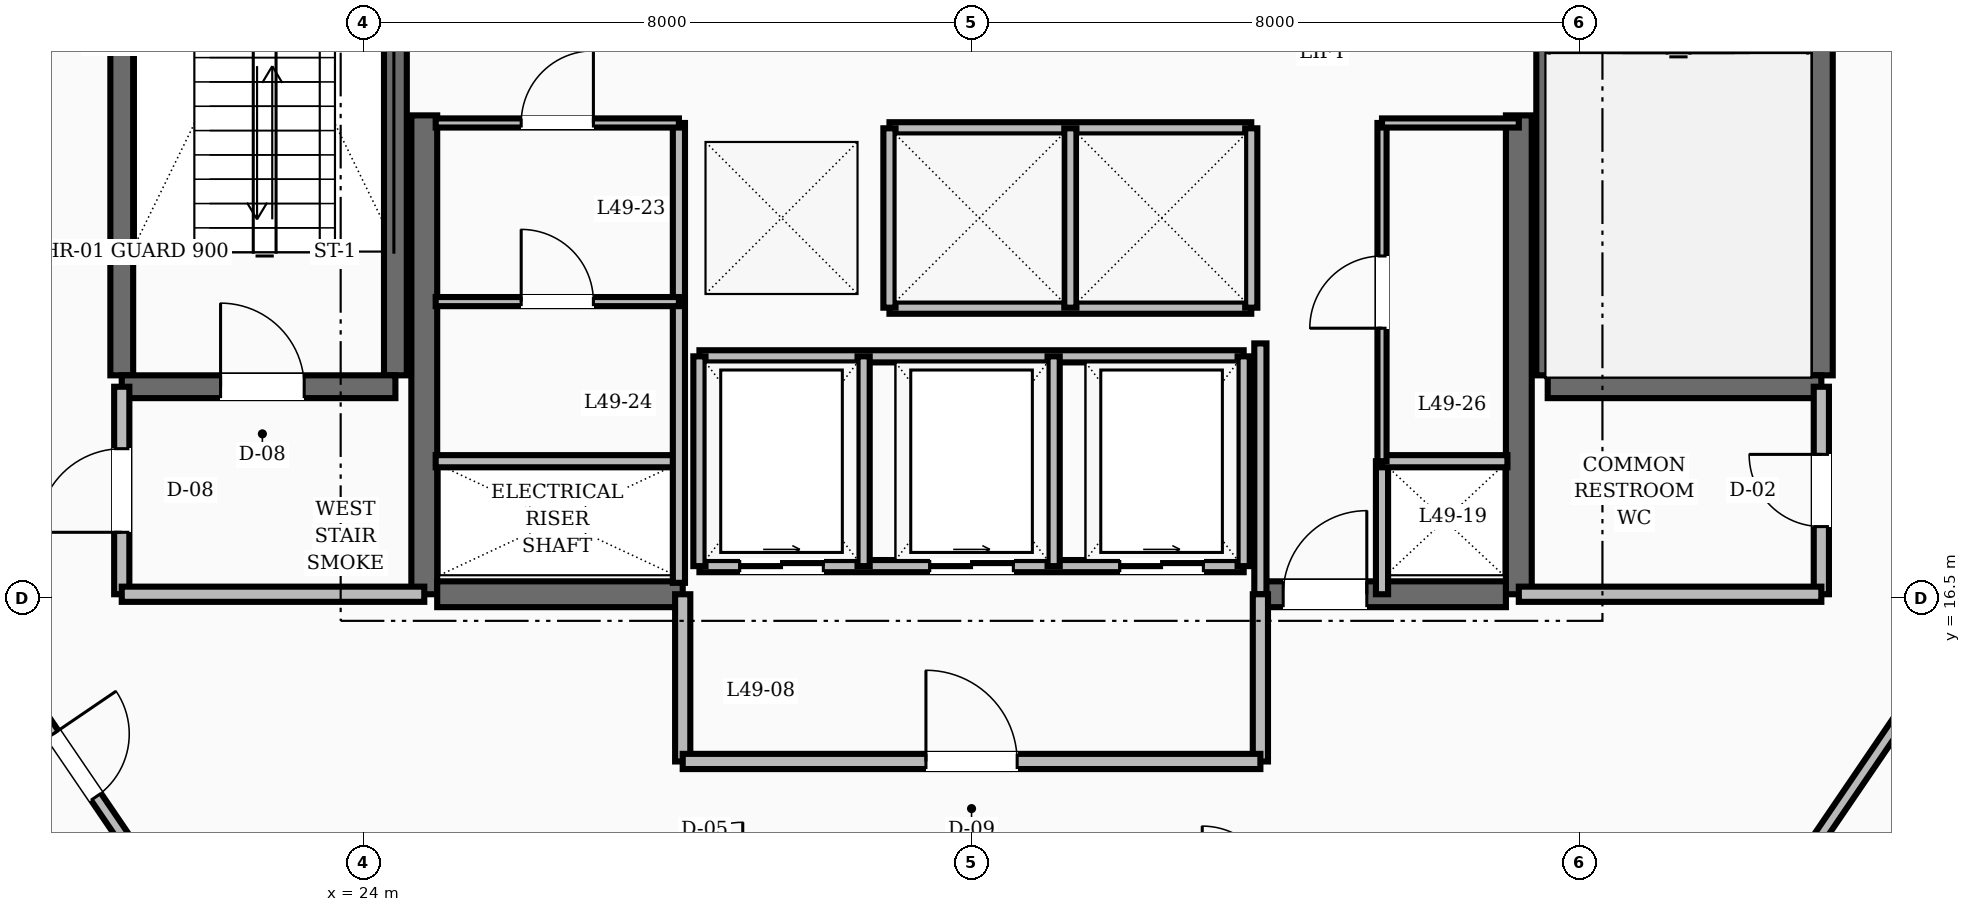
"""IFC4 building model, lengths in metres.
Left out: names, types, materials, properties, quantities, classifications, styles, units other than length and angle.
Written with IfcOpenShell. Run it as: python <this file> out.ifc"""

import sys

from ifc_helpers import new_model, si_unit, direction, frame, frame_2d, origin, place, context, subcontext, project, spatial, rectangle, extrude, element, fill, save


model = new_model("IFC4")
c1 = context("Model", 3, precision=1e-05, world=origin(), true_north=direction((0.0, 1.0)))
c2 = subcontext(c1, "Body", "Model", "MODEL_VIEW")
j1 = project(units=[si_unit("LENGTHUNIT", "METRE"), si_unit("PLANEANGLEUNIT", "RADIAN")], contexts=[c1])
p1 = place(None, origin())
s1 = spatial("IfcSite", under=j1, at=p1, CompositionType="ELEMENT")
p2 = place(p1, origin())
s2 = spatial("IfcBuilding", under=s1, at=p2, CompositionType="ELEMENT")
p3 = place(p2, frame((0.0, 0.0, 189.2)))
s3 = spatial("IfcBuildingStorey", under=s2, at=p3, CompositionType="ELEMENT", Elevation=189.2)
for number, where, z_axis, x_axis in (
    (1, (24.8, 16.55, 0.0), (0.0, 0.0, 1.0), (0.0, 1.0, 0.0)),
    (2, (39.2, 16.55, 0.0), (0.0, 0.0, 1.0), (0.0, 1.0, 0.0)),
):
    element("IfcWall", number, at=place(p3, frame(where, z_axis=z_axis, x_axis=x_axis)), inside=s3, PredefinedType="SHEAR", context=c2, shape_type="SweptSolid", body=[
        extrude(rectangle(XDim=6.3, YDim=0.34, at=frame_2d((3.15, 0.0))), origin(), (0.0, 0.0, 1.0), 3.6),
    ])
p4 = place(p3, frame((24.97, 16.55, 0.0), z_axis=(0.0, 0.0, 1.0), x_axis=(1.0, 0.0, 0.0)))
e3 = element("IfcWall", 3, at=p4, inside=s3, PredefinedType="SHEAR", context=c2, shape_type="SweptSolid", body=[
    extrude(rectangle(XDim=3.23, YDim=0.34, at=frame_2d((1.615, 0.0))), origin(), (0.0, 0.0, 1.0), 3.6),
])
p5 = place(p3, frame((35.8, 16.55, 0.0), z_axis=(0.0, 0.0, 1.0), x_axis=(1.0, 0.0, 0.0)))
e4 = element("IfcWall", 4, at=p5, inside=s3, PredefinedType="SHEAR", context=c2, shape_type="SweptSolid", body=[
    extrude(rectangle(XDim=3.23, YDim=0.34, at=frame_2d((1.615, 0.0))), origin(), (0.0, 0.0, 1.0), 3.6),
])
p6 = place(p5, frame((0.3, 0.0, 0.0)))
e5 = element("IfcOpeningElement", 5, at=p6, cuts=e4, PredefinedType="OPENING", context=c2, shape_type="SweptSolid", body=[
    extrude(rectangle(XDim=1.1, YDim=2.1, at=frame_2d((0.55, 1.05))), frame((0.0, 0.18, 0.0), z_axis=(0.0, -1.0, 0.0), x_axis=(1.0, 0.0, 0.0)), (0.0, 0.0, 1.0), 0.36),
])
for number, where, z_axis, x_axis in (
    (6, (20.82, 19.43, 0.0), (0.0, 0.0, 1.0), (0.0, 1.0, 0.0)),
    (7, (24.42, 19.43, 0.0), (0.0, 0.0, 1.0), (0.0, 1.0, 0.0)),
):
    element("IfcWall", number, at=place(p3, frame(where, z_axis=z_axis, x_axis=x_axis)), inside=s3, PredefinedType="SHEAR", context=c2, shape_type="SweptSolid", body=[
        extrude(rectangle(XDim=8.74, YDim=0.3, at=frame_2d((4.37, 0.0))), origin(), (0.0, 0.0, 1.0), 3.6),
    ])
p7 = place(p3, frame((20.82, 19.28, 0.0), z_axis=(0.0, 0.0, 1.0), x_axis=(1.0, 0.0, 0.0)))
e8 = element("IfcWall", 8, at=p7, inside=s3, PredefinedType="SHEAR", context=c2, shape_type="SweptSolid", body=[
    extrude(rectangle(XDim=3.6, YDim=0.3, at=frame_2d((1.8, 0.0))), origin(), (0.0, 0.0, 1.0), 3.6),
])
p8 = place(p7, frame((1.3, 0.0, 0.0)))
e9 = element("IfcOpeningElement", 9, at=p8, cuts=e8, PredefinedType="OPENING", context=c2, shape_type="SweptSolid", body=[
    extrude(rectangle(XDim=1.1, YDim=2.1, at=frame_2d((0.55, 1.05))), frame((0.0, 0.16, 0.0), z_axis=(0.0, -1.0, 0.0), x_axis=(1.0, 0.0, 0.0)), (0.0, 0.0, 1.0), 0.32),
])
for number, where, z_axis, x_axis in (
    (10, (43.18, 19.43, 0.0), (0.0, 0.0, 1.0), (0.0, 1.0, 0.0)),
    (11, (39.58, 19.43, 0.0), (0.0, 0.0, 1.0), (0.0, 1.0, 0.0)),
):
    element("IfcWall", number, at=place(p3, frame(where, z_axis=z_axis, x_axis=x_axis)), inside=s3, PredefinedType="SHEAR", context=c2, shape_type="SweptSolid", body=[
        extrude(rectangle(XDim=8.74, YDim=0.3, at=frame_2d((4.37, 0.0))), origin(), (0.0, 0.0, 1.0), 3.6),
    ])
p9 = place(p3, frame((39.58, 19.28, 0.0), z_axis=(0.0, 0.0, 1.0), x_axis=(1.0, 0.0, 0.0)))
e12 = element("IfcWall", 12, at=p9, inside=s3, PredefinedType="SHEAR", context=c2, shape_type="SweptSolid", body=[
    extrude(rectangle(XDim=3.6, YDim=0.3, at=frame_2d((1.8, 0.0))), origin(), (0.0, 0.0, 1.0), 3.6),
])
p10 = place(p3, frame((20.82, 16.55, 0.0), z_axis=(0.0, 0.0, 1.0), x_axis=(0.0, 1.0, 0.0)))
e13 = element("IfcWall", 13, at=p10, inside=s3, PredefinedType="SOLIDWALL", context=c2, shape_type="SweptSolid", body=[
    extrude(rectangle(XDim=2.73, YDim=0.2, at=frame_2d((1.365, 0.0))), origin(), (0.0, 0.0, 1.0), 2.8),
])
p11 = place(p10, frame((0.815, 0.0, 0.0)))
e14 = element("IfcOpeningElement", 14, at=p11, cuts=e13, PredefinedType="OPENING", context=c2, shape_type="SweptSolid", body=[
    extrude(rectangle(XDim=1.1, YDim=2.1, at=frame_2d((0.55, 1.05))), frame((0.0, 0.11, 0.0), z_axis=(0.0, -1.0, 0.0), x_axis=(1.0, 0.0, 0.0)), (0.0, 0.0, 1.0), 0.22),
])
p12 = place(p3, frame((20.82, 16.55, 0.0), z_axis=(0.0, 0.0, 1.0), x_axis=(1.0, 0.0, 0.0)))
e15 = element("IfcWall", 15, at=p12, inside=s3, PredefinedType="SOLIDWALL", context=c2, shape_type="SweptSolid", body=[
    extrude(rectangle(XDim=3.98, YDim=0.2, at=frame_2d((1.99, 0.0))), origin(), (0.0, 0.0, 1.0), 2.8),
])
p13 = place(p3, frame((43.18, 16.55, 0.0), z_axis=(0.0, 0.0, 1.0), x_axis=(0.0, 1.0, 0.0)))
e16 = element("IfcWall", 16, at=p13, inside=s3, PredefinedType="SOLIDWALL", context=c2, shape_type="SweptSolid", body=[
    extrude(rectangle(XDim=2.73, YDim=0.2, at=frame_2d((1.365, 0.0))), origin(), (0.0, 0.0, 1.0), 2.8),
])
p14 = place(p13, frame((0.89, 0.0, 0.0)))
e17 = element("IfcOpeningElement", 17, at=p14, cuts=e16, PredefinedType="OPENING", context=c2, shape_type="SweptSolid", body=[
    extrude(rectangle(XDim=0.95, YDim=2.1, at=frame_2d((0.475, 1.05))), frame((0.0, 0.11, 0.0), z_axis=(0.0, -1.0, 0.0), x_axis=(1.0, 0.0, 0.0)), (0.0, 0.0, 1.0), 0.22),
])
p15 = place(p3, frame((39.2, 16.55, 0.0), z_axis=(0.0, 0.0, 1.0), x_axis=(1.0, 0.0, 0.0)))
e18 = element("IfcWall", 18, at=p15, inside=s3, PredefinedType="SOLIDWALL", context=c2, shape_type="SweptSolid", body=[
    extrude(rectangle(XDim=3.98, YDim=0.2, at=frame_2d((1.99, 0.0))), origin(), (0.0, 0.0, 1.0), 2.8),
])
p16 = place(p3, frame((35.8, 16.55, 0.0), z_axis=(0.0, 0.0, 1.0), x_axis=(0.0, 1.0, 0.0)))
e19 = element("IfcWall", 19, at=p16, inside=s3, PredefinedType="SOLIDWALL", context=c2, shape_type="SweptSolid", body=[
    extrude(rectangle(XDim=3.3, YDim=0.16, at=frame_2d((1.65, 0.0))), origin(), (0.0, 0.0, 1.0), 2.8),
])
p17 = place(p3, frame((37.4, 16.55, 0.0), z_axis=(0.0, 0.0, 1.0), x_axis=(0.0, 1.0, 0.0)))
e20 = element("IfcWall", 20, at=p17, inside=s3, PredefinedType="SOLIDWALL", context=c2, shape_type="SweptSolid", body=[
    extrude(rectangle(XDim=1.75, YDim=0.16, at=frame_2d((0.875, 0.0))), origin(), (0.0, 0.0, 1.0), 2.8),
])
for number, where, z_axis, x_axis in (
    (21, (28.2, 14.35, 0.0), (0.0, 0.0, 1.0), (0.0, 1.0, 0.0)),
    (22, (35.8, 14.35, 0.0), (0.0, 0.0, 1.0), (0.0, 1.0, 0.0)),
):
    element("IfcWall", number, at=place(p3, frame(where, z_axis=z_axis, x_axis=x_axis)), inside=s3, PredefinedType="SOLIDWALL", context=c2, shape_type="SweptSolid", body=[
        extrude(rectangle(XDim=2.2, YDim=0.2, at=frame_2d((1.1, 0.0))), origin(), (0.0, 0.0, 1.0), 2.8),
    ])
p18 = place(p3, frame((28.2, 14.35, 0.0), z_axis=(0.0, 0.0, 1.0), x_axis=(1.0, 0.0, 0.0)))
e23 = element("IfcWall", 23, at=p18, inside=s3, PredefinedType="SOLIDWALL", context=c2, shape_type="SweptSolid", body=[
    extrude(rectangle(XDim=7.6, YDim=0.2, at=frame_2d((3.8, 0.0))), origin(), (0.0, 0.0, 1.0), 2.8),
])
p19 = place(p18, frame((3.2, 0.0, 0.0)))
e24 = element("IfcOpeningElement", 24, at=p19, cuts=e23, PredefinedType="OPENING", context=c2, shape_type="SweptSolid", body=[
    extrude(rectangle(XDim=1.2, YDim=2.1, at=frame_2d((0.6, 1.05))), frame((0.0, 0.11, 0.0), z_axis=(0.0, -1.0, 0.0), x_axis=(1.0, 0.0, 0.0)), (0.0, 0.0, 1.0), 0.22),
])
for number, where, z_axis, x_axis in (
    (25, (30.92, 22.68, 0.0), (0.0, 0.0, 1.0), (1.0, 0.0, 0.0)),
    (26, (30.92, 20.32, 0.0), (0.0, 0.0, 1.0), (1.0, 0.0, 0.0)),
):
    element("IfcWall", number, at=place(p3, frame(where, z_axis=z_axis, x_axis=x_axis)), inside=s3, PredefinedType="SOLIDWALL", context=c2, shape_type="SweptSolid", body=[
        extrude(rectangle(XDim=4.76, YDim=0.16, at=frame_2d((2.38, 0.0))), origin(), (0.0, 0.0, 1.0), 2.8),
    ])
for number, where, z_axis, x_axis in (
    (27, (30.92, 20.32, 0.0), (0.0, 0.0, 1.0), (0.0, 1.0, 0.0)),
    (28, (33.3, 20.32, 0.0), (0.0, 0.0, 1.0), (0.0, 1.0, 0.0)),
    (29, (35.68, 20.32, 0.0), (0.0, 0.0, 1.0), (0.0, 1.0, 0.0)),
):
    element("IfcWall", number, at=place(p3, frame(where, z_axis=z_axis, x_axis=x_axis)), inside=s3, PredefinedType="SOLIDWALL", context=c2, shape_type="SweptSolid", body=[
        extrude(rectangle(XDim=2.36, YDim=0.16, at=frame_2d((1.18, 0.0))), origin(), (0.0, 0.0, 1.0), 2.8),
    ])
p20 = place(p3, frame((28.42, 16.92, 0.0), z_axis=(0.0, 0.0, 1.0), x_axis=(1.0, 0.0, 0.0)))
e30 = element("IfcWall", 30, at=p20, inside=s3, PredefinedType="SOLIDWALL", context=c2, shape_type="SweptSolid", body=[
    extrude(rectangle(XDim=7.16, YDim=0.16, at=frame_2d((3.58, 0.0))), origin(), (0.0, 0.0, 1.0), 2.8),
])
p21 = place(p20, frame((0.53, 0.0, 0.0)))
e31 = element("IfcOpeningElement", 31, at=p21, cuts=e30, PredefinedType="OPENING", context=c2, shape_type="SweptSolid", body=[
    extrude(rectangle(XDim=1.1, YDim=2.15, at=frame_2d((0.55, 1.075))), frame((0.0, 0.09, 0.0), z_axis=(0.0, -1.0, 0.0), x_axis=(1.0, 0.0, 0.0)), (0.0, 0.0, 1.0), 0.18),
])
p22 = place(p20, frame((3.03, 0.0, 0.0)))
e32 = element("IfcOpeningElement", 32, at=p22, cuts=e30, PredefinedType="OPENING", context=c2, shape_type="SweptSolid", body=[
    extrude(rectangle(XDim=1.1, YDim=2.15, at=frame_2d((0.55, 1.075))), frame((0.0, 0.09, 0.0), z_axis=(0.0, -1.0, 0.0), x_axis=(1.0, 0.0, 0.0)), (0.0, 0.0, 1.0), 0.18),
])
p23 = place(p20, frame((5.53, 0.0, 0.0)))
e33 = element("IfcOpeningElement", 33, at=p23, cuts=e30, PredefinedType="OPENING", context=c2, shape_type="SweptSolid", body=[
    extrude(rectangle(XDim=1.1, YDim=2.15, at=frame_2d((0.55, 1.075))), frame((0.0, 0.09, 0.0), z_axis=(0.0, -1.0, 0.0), x_axis=(1.0, 0.0, 0.0)), (0.0, 0.0, 1.0), 0.18),
])
p24 = place(p3, frame((28.42, 19.68, 0.0), z_axis=(0.0, 0.0, 1.0), x_axis=(1.0, 0.0, 0.0)))
e34 = element("IfcWall", 34, at=p24, inside=s3, PredefinedType="SOLIDWALL", context=c2, shape_type="SweptSolid", body=[
    extrude(rectangle(XDim=7.16, YDim=0.16, at=frame_2d((3.58, 0.0))), origin(), (0.0, 0.0, 1.0), 2.8),
])
for number, where, z_axis, x_axis in (
    (35, (28.42, 16.92, 0.0), (0.0, 0.0, 1.0), (0.0, 1.0, 0.0)),
    (36, (30.58, 16.92, 0.0), (0.0, 0.0, 1.0), (0.0, 1.0, 0.0)),
    (37, (33.08, 16.92, 0.0), (0.0, 0.0, 1.0), (0.0, 1.0, 0.0)),
    (38, (35.58, 16.92, 0.0), (0.0, 0.0, 1.0), (0.0, 1.0, 0.0)),
):
    element("IfcWall", number, at=place(p3, frame(where, z_axis=z_axis, x_axis=x_axis)), inside=s3, PredefinedType="SOLIDWALL", context=c2, shape_type="SweptSolid", body=[
        extrude(rectangle(XDim=2.76, YDim=0.16, at=frame_2d((1.38, 0.0))), origin(), (0.0, 0.0, 1.0), 2.8),
    ])
p25 = place(p3, frame((24.95, 18.3, 0.0), z_axis=(0.0, 0.0, 1.0), x_axis=(1.0, 0.0, 0.0)))
e39 = element("IfcWall", 39, at=p25, inside=s3, PredefinedType="SOLIDWALL", context=c2, shape_type="SweptSolid", body=[
    extrude(rectangle(XDim=3.2, YDim=0.16, at=frame_2d((1.6, 0.0))), origin(), (0.0, 0.0, 1.0), 2.8),
])
p26 = place(p3, frame((28.15, 16.7, 0.0), z_axis=(0.0, 0.0, 1.0), x_axis=(0.0, 1.0, 0.0)))
e40 = element("IfcWall", 40, at=p26, inside=s3, PredefinedType="SOLIDWALL", context=c2, shape_type="SweptSolid", body=[
    extrude(rectangle(XDim=6.05, YDim=0.16, at=frame_2d((3.025, 0.0))), origin(), (0.0, 0.0, 1.0), 2.8),
])
p27 = place(p3, frame((37.4, 18.3, 0.0), z_axis=(0.0, 0.0, 1.0), x_axis=(1.0, 0.0, 0.0)))
e41 = element("IfcWall", 41, at=p27, inside=s3, PredefinedType="SOLIDWALL", context=c2, shape_type="SweptSolid", body=[
    extrude(rectangle(XDim=1.65, YDim=0.16, at=frame_2d((0.825, 0.0))), origin(), (0.0, 0.0, 1.0), 2.8),
])
p28 = place(p3, frame((24.95, 22.75, 0.0), z_axis=(0.0, 0.0, 1.0), x_axis=(1.0, 0.0, 0.0)))
e42 = element("IfcWall", 42, at=p28, inside=s3, PredefinedType="PARTITIONING", context=c2, shape_type="SweptSolid", body=[
    extrude(rectangle(XDim=3.2, YDim=0.12, at=frame_2d((1.6, 0.0))), origin(), (0.0, 0.0, 1.0), 2.8),
])
p29 = place(p28, frame((1.125, 0.0, 0.0)))
e43 = element("IfcOpeningElement", 43, at=p29, cuts=e42, PredefinedType="OPENING", context=c2, shape_type="SweptSolid", body=[
    extrude(rectangle(XDim=0.95, YDim=2.1, at=frame_2d((0.475, 1.05))), frame((0.0, 0.07, 0.0), z_axis=(0.0, -1.0, 0.0), x_axis=(1.0, 0.0, 0.0)), (0.0, 0.0, 1.0), 0.14),
])
p30 = place(p3, frame((37.4, 18.3, 0.0), z_axis=(0.0, 0.0, 1.0), x_axis=(0.0, 1.0, 0.0)))
e44 = element("IfcWall", 44, at=p30, inside=s3, PredefinedType="PARTITIONING", context=c2, shape_type="SweptSolid", body=[
    extrude(rectangle(XDim=4.45, YDim=0.12, at=frame_2d((2.225, 0.0))), origin(), (0.0, 0.0, 1.0), 2.8),
])
p31 = place(p30, frame((1.75, 0.0, 0.0)))
e45 = element("IfcOpeningElement", 45, at=p31, cuts=e44, PredefinedType="OPENING", context=c2, shape_type="SweptSolid", body=[
    extrude(rectangle(XDim=0.95, YDim=2.1, at=frame_2d((0.475, 1.05))), frame((0.0, 0.07, 0.0), z_axis=(0.0, -1.0, 0.0), x_axis=(1.0, 0.0, 0.0)), (0.0, 0.0, 1.0), 0.14),
])
p32 = place(p3, frame((37.4, 22.75, 0.0), z_axis=(0.0, 0.0, 1.0), x_axis=(1.0, 0.0, 0.0)))
e46 = element("IfcWall", 46, at=p32, inside=s3, PredefinedType="PARTITIONING", context=c2, shape_type="SweptSolid", body=[
    extrude(rectangle(XDim=1.8, YDim=0.12, at=frame_2d((0.9, 0.0))), origin(), (0.0, 0.0, 1.0), 2.8),
])
p33 = place(p3, frame((24.95, 20.4, 0.0), z_axis=(0.0, 0.0, 1.0), x_axis=(1.0, 0.0, 0.0)))
e47 = element("IfcWall", 47, at=p33, inside=s3, PredefinedType="PARTITIONING", context=c2, shape_type="SweptSolid", body=[
    extrude(rectangle(XDim=3.2, YDim=0.12, at=frame_2d((1.6, 0.0))), origin(), (0.0, 0.0, 1.0), 2.8),
])
p34 = place(p33, frame((1.125, 0.0, 0.0)))
e48 = element("IfcOpeningElement", 48, at=p34, cuts=e47, PredefinedType="OPENING", context=c2, shape_type="SweptSolid", body=[
    extrude(rectangle(XDim=0.95, YDim=2.1, at=frame_2d((0.475, 1.05))), frame((0.0, 0.07, 0.0), z_axis=(0.0, -1.0, 0.0), x_axis=(1.0, 0.0, 0.0)), (0.0, 0.0, 1.0), 0.14),
])
p35 = place(p3, frame((19.35, 15.548, 0.0), z_axis=(0.0, 0.0, 1.0), x_axis=(0.562674669208, -0.826678423955, 0.0)))
e49 = element("IfcWall", 49, at=p35, inside=s3, PredefinedType="SOLIDWALL", context=c2, shape_type="SweptSolid", body=[
    extrude(rectangle(XDim=3.021, YDim=0.16, at=frame_2d((1.511, 0.0))), origin(), (0.0, 0.0, 1.0), 2.8),
])
p36 = place(p35, frame((1.01, 0.0, 0.0)))
e50 = element("IfcOpeningElement", 50, at=p36, cuts=e49, PredefinedType="OPENING", context=c2, shape_type="SweptSolid", body=[
    extrude(rectangle(XDim=1.0, YDim=2.1, at=frame_2d((0.5, 1.05))), frame((0.0, 0.09, 0.0), z_axis=(0.0, -1.0, 0.0), x_axis=(1.0, 0.0, 0.0)), (0.0, 0.0, 1.0), 0.18),
])
p37 = place(p3, frame((42.95, 13.05, 0.0), z_axis=(0.0, 0.0, 1.0), x_axis=(0.562674669208, 0.826678423955, 0.0)))
e51 = element("IfcWall", 51, at=p37, inside=s3, PredefinedType="SOLIDWALL", context=c2, shape_type="SweptSolid", body=[
    extrude(rectangle(XDim=3.021, YDim=0.16, at=frame_2d((1.511, 0.0))), origin(), (0.0, 0.0, 1.0), 2.8),
])
p38 = place(p8, origin())
e52 = element("IfcDoor", 52, at=p38, inside=s3, OperationType="SINGLE_SWING_LEFT", PredefinedType="DOOR", context=c2, shape_type="SweptSolid", body=[
    extrude(rectangle(XDim=1.1, YDim=2.1, at=frame_2d((0.55, 1.05))), frame((0.0, 0.025, 0.0), z_axis=(0.0, -1.0, 0.0), x_axis=(1.0, 0.0, 0.0)), (0.0, 0.0, 1.0), 0.05),
])
fill(e9, e52)
p39 = place(p11, origin())
e53 = element("IfcDoor", 53, at=p39, inside=s3, OperationType="SINGLE_SWING_LEFT", PredefinedType="DOOR", context=c2, shape_type="SweptSolid", body=[
    extrude(rectangle(XDim=1.1, YDim=2.1, at=frame_2d((0.55, 1.05))), frame((0.0, 0.025, 0.0), z_axis=(0.0, -1.0, 0.0), x_axis=(1.0, 0.0, 0.0)), (0.0, 0.0, 1.0), 0.05),
])
fill(e14, e53)
p40 = place(p14, origin())
e54 = element("IfcDoor", 54, at=p40, inside=s3, OperationType="SINGLE_SWING_RIGHT", PredefinedType="DOOR", context=c2, shape_type="SweptSolid", body=[
    extrude(rectangle(XDim=0.95, YDim=2.1, at=frame_2d((0.475, 1.05))), frame((0.0, 0.025, 0.0), z_axis=(0.0, -1.0, 0.0), x_axis=(1.0, 0.0, 0.0)), (0.0, 0.0, 1.0), 0.05),
])
fill(e17, e54)
p41 = place(p6, origin())
e55 = element("IfcDoor", 55, at=p41, inside=s3, OperationType="SINGLE_SWING_RIGHT", PredefinedType="DOOR", context=c2, shape_type="SweptSolid", body=[
    extrude(rectangle(XDim=1.1, YDim=2.1, at=frame_2d((0.55, 1.05))), frame((0.0, 0.025, 0.0), z_axis=(0.0, -1.0, 0.0), x_axis=(1.0, 0.0, 0.0)), (0.0, 0.0, 1.0), 0.05),
])
fill(e5, e55)
p42 = place(p19, origin())
e56 = element("IfcDoor", 56, at=p42, inside=s3, OperationType="SINGLE_SWING_LEFT", PredefinedType="DOOR", context=c2, shape_type="SweptSolid", body=[
    extrude(rectangle(XDim=1.2, YDim=2.1, at=frame_2d((0.6, 1.05))), frame((0.0, 0.025, 0.0), z_axis=(0.0, -1.0, 0.0), x_axis=(1.0, 0.0, 0.0)), (0.0, 0.0, 1.0), 0.05),
])
fill(e24, e56)
p43 = place(p21, origin())
e57 = element("IfcDoor", 57, at=p43, inside=s3, OperationType="SLIDING_TO_RIGHT", PredefinedType="DOOR", context=c2, shape_type="SweptSolid", body=[
    extrude(rectangle(XDim=1.1, YDim=2.15, at=frame_2d((0.55, 1.075))), frame((0.0, 0.025, 0.0), z_axis=(0.0, -1.0, 0.0), x_axis=(1.0, 0.0, 0.0)), (0.0, 0.0, 1.0), 0.05),
])
fill(e31, e57)
p44 = place(p22, origin())
e58 = element("IfcDoor", 58, at=p44, inside=s3, OperationType="SLIDING_TO_RIGHT", PredefinedType="DOOR", context=c2, shape_type="SweptSolid", body=[
    extrude(rectangle(XDim=1.1, YDim=2.15, at=frame_2d((0.55, 1.075))), frame((0.0, 0.025, 0.0), z_axis=(0.0, -1.0, 0.0), x_axis=(1.0, 0.0, 0.0)), (0.0, 0.0, 1.0), 0.05),
])
fill(e32, e58)
p45 = place(p23, origin())
e59 = element("IfcDoor", 59, at=p45, inside=s3, OperationType="SLIDING_TO_RIGHT", PredefinedType="DOOR", context=c2, shape_type="SweptSolid", body=[
    extrude(rectangle(XDim=1.1, YDim=2.15, at=frame_2d((0.55, 1.075))), frame((0.0, 0.025, 0.0), z_axis=(0.0, -1.0, 0.0), x_axis=(1.0, 0.0, 0.0)), (0.0, 0.0, 1.0), 0.05),
])
fill(e33, e59)
p46 = place(p29, origin())
e60 = element("IfcDoor", 60, at=p46, inside=s3, OperationType="SINGLE_SWING_RIGHT", PredefinedType="DOOR", context=c2, shape_type="SweptSolid", body=[
    extrude(rectangle(XDim=0.95, YDim=2.1, at=frame_2d((0.475, 1.05))), frame((0.0, 0.025, 0.0), z_axis=(0.0, -1.0, 0.0), x_axis=(1.0, 0.0, 0.0)), (0.0, 0.0, 1.0), 0.05),
])
fill(e43, e60)
p47 = place(p34, origin())
e61 = element("IfcDoor", 61, at=p47, inside=s3, OperationType="SINGLE_SWING_LEFT", PredefinedType="DOOR", context=c2, shape_type="SweptSolid", body=[
    extrude(rectangle(XDim=0.95, YDim=2.1, at=frame_2d((0.475, 1.05))), frame((0.0, 0.025, 0.0), z_axis=(0.0, -1.0, 0.0), x_axis=(1.0, 0.0, 0.0)), (0.0, 0.0, 1.0), 0.05),
])
fill(e48, e61)
p48 = place(p31, origin())
e62 = element("IfcDoor", 62, at=p48, inside=s3, OperationType="SINGLE_SWING_LEFT", PredefinedType="DOOR", context=c2, shape_type="SweptSolid", body=[
    extrude(rectangle(XDim=0.95, YDim=2.1, at=frame_2d((0.475, 1.05))), frame((0.0, 0.025, 0.0), z_axis=(0.0, -1.0, 0.0), x_axis=(1.0, 0.0, 0.0)), (0.0, 0.0, 1.0), 0.05),
])
fill(e45, e62)
p49 = place(p36, origin())
e63 = element("IfcDoor", 63, at=p49, inside=s3, OperationType="SINGLE_SWING_LEFT", PredefinedType="DOOR", context=c2, shape_type="SweptSolid", body=[
    extrude(rectangle(XDim=1.0, YDim=2.1, at=frame_2d((0.5, 1.05))), frame((0.0, 0.025, 0.0), z_axis=(0.0, -1.0, 0.0), x_axis=(1.0, 0.0, 0.0)), (0.0, 0.0, 1.0), 0.05),
])
fill(e50, e63)
save(model, sys.argv[1])
